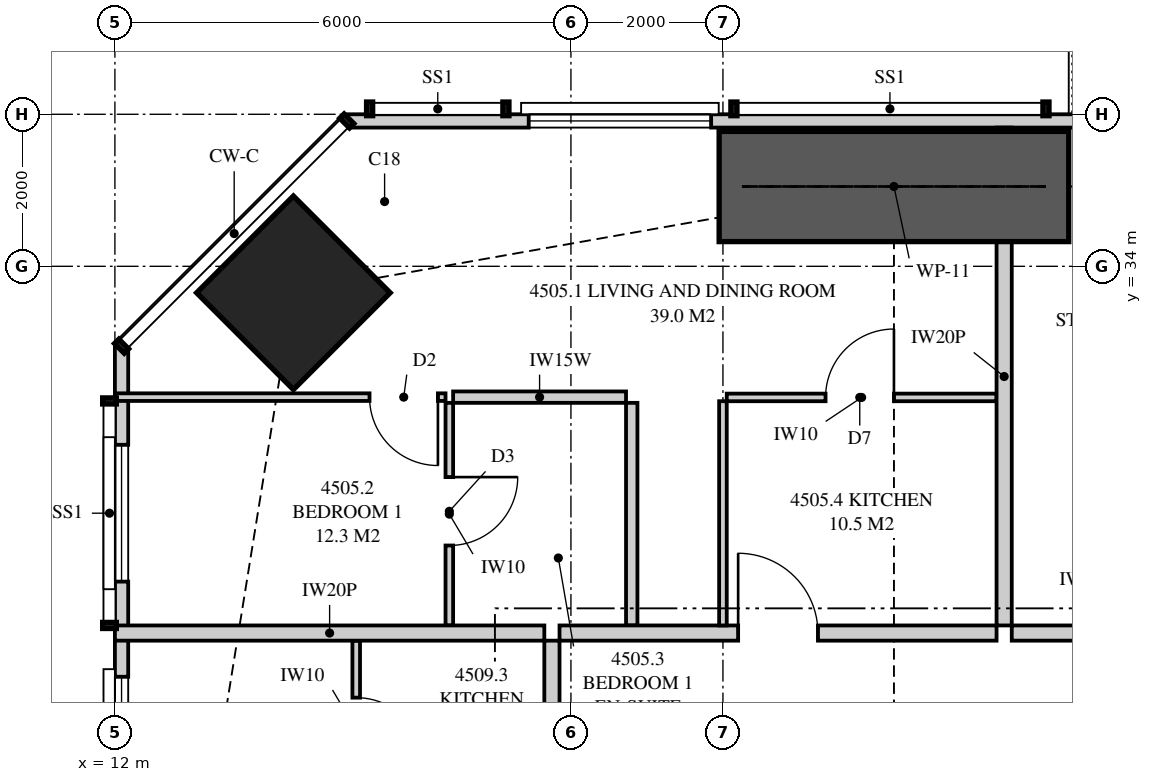
"""IFC4 building model, lengths in metres.
Left out: names, types, materials, properties, quantities, classifications, styles, units other than length and angle.
Written with IfcOpenShell. Run it as: python <this file> out.ifc"""

import sys

from ifc_helpers import new_model, si_unit, direction, frame, frame_2d, origin, origin_2d, place, context, subcontext, project, spatial, polyline, rectangle, outline, extrude, element, fill, save


model = new_model("IFC4")
c1 = context("Model", 3, precision=1e-05, world=origin(), true_north=direction((0.0, 1.0)))
c2 = subcontext(c1, "Body", "Model", "MODEL_VIEW")
j1 = project(units=[si_unit("LENGTHUNIT", "METRE"), si_unit("PLANEANGLEUNIT", "RADIAN")], contexts=[c1])
p1 = place(None, origin())
s1 = spatial("IfcSite", under=j1, at=p1, CompositionType="ELEMENT")
p2 = place(p1, origin())
s2 = spatial("IfcBuilding", under=s1, at=p2, CompositionType="ELEMENT")
p3 = place(p2, frame((0.0, 0.0, 167.75)))
s3 = spatial("IfcBuildingStorey", under=s2, at=p3, CompositionType="ELEMENT", Elevation=167.75)
p4 = place(p3, frame((14.348, 33.652, 0.0), z_axis=(0.0, 0.0, 1.0), x_axis=(0.707106781187, 0.707106781187, 0.0)))
e1 = element("IfcColumn", 1, at=p4, inside=s3, PredefinedType="COLUMN", context=c2, shape_type="SweptSolid", body=[
    extrude(rectangle(XDim=1.8, YDim=1.8, at=origin_2d()), origin(), (0.0, 0.0, 1.0), 3.35),
])
p5 = place(p3, frame((49.949, 35.913, 0.0), z_axis=(0.0, 0.0, 1.0), x_axis=(-1.0, 0.0, 0.0)))
e2 = element("IfcWall", 2, at=p5, inside=s3, PredefinedType="SOLIDWALL", context=c2, shape_type="SweptSolid", body=[
    extrude(outline(polyline([(0.0, 0.0), (34.897, 0.0), (34.897, 3.11), (27.91, 3.11), (27.91, 2.15), (27.836, 2.15), (27.836, 3.11), (27.699, 3.11), (27.699, 2.15), (7.199, 2.15), (7.199, 3.11), (7.062, 3.11), (7.062, 2.15), (6.987, 2.15), (6.987, 3.11), (0.0, 3.11), (0.0, 0.0)])), frame((0.0, 0.087, 0.0), z_axis=(0.0, -1.0, 0.0), x_axis=(1.0, 0.0, 0.0)), (0.0, 0.0, 1.0), 0.175),
])
p6 = place(p5, frame((2.149, 0.0, 0.4)))
e3 = element("IfcOpeningElement", 3, at=p6, cuts=e2, PredefinedType="OPENING", context=c2, shape_type="SweptSolid", body=[
    extrude(rectangle(XDim=1.8, YDim=1.7, at=frame_2d((0.9, 0.85))), frame((0.0, 0.097, 0.0), z_axis=(0.0, -1.0, 0.0), x_axis=(1.0, 0.0, 0.0)), (0.0, 0.0, 1.0), 0.195),
])
p7 = place(p5, frame((10.299, 0.0, 0.0)))
e4 = element("IfcOpeningElement", 4, at=p7, cuts=e2, PredefinedType="OPENING", context=c2, shape_type="SweptSolid", body=[
    extrude(rectangle(XDim=1.8, YDim=2.1, at=frame_2d((0.9, 1.05))), frame((0.0, 0.097, 0.0), z_axis=(0.0, -1.0, 0.0), x_axis=(1.0, 0.0, 0.0)), (0.0, 0.0, 1.0), 0.195),
])
p8 = place(p5, frame((13.231, 0.0, 0.4)))
e5 = element("IfcOpeningElement", 5, at=p8, cuts=e2, PredefinedType="OPENING", context=c2, shape_type="SweptSolid", body=[
    extrude(rectangle(XDim=1.8, YDim=1.7, at=frame_2d((0.9, 0.85))), frame((0.0, 0.097, 0.0), z_axis=(0.0, -1.0, 0.0), x_axis=(1.0, 0.0, 0.0)), (0.0, 0.0, 1.0), 0.195),
])
p9 = place(p5, frame((22.699, 0.0, 0.0)))
e6 = element("IfcOpeningElement", 6, at=p9, cuts=e2, PredefinedType="OPENING", context=c2, shape_type="SweptSolid", body=[
    extrude(rectangle(XDim=1.8, YDim=2.1, at=frame_2d((0.9, 1.05))), frame((0.0, 0.097, 0.0), z_axis=(0.0, -1.0, 0.0), x_axis=(1.0, 0.0, 0.0)), (0.0, 0.0, 1.0), 0.195),
])
p10 = place(p5, frame((19.853, 0.0, 0.4)))
e7 = element("IfcOpeningElement", 7, at=p10, cuts=e2, PredefinedType="OPENING", context=c2, shape_type="SweptSolid", body=[
    extrude(rectangle(XDim=2.4, YDim=1.7, at=frame_2d((1.2, 0.85))), frame((0.0, 0.097, 0.0), z_axis=(0.0, -1.0, 0.0), x_axis=(1.0, 0.0, 0.0)), (0.0, 0.0, 1.0), 0.195),
])
p11 = place(p5, frame((30.104, 0.0, 0.4)))
e8 = element("IfcOpeningElement", 8, at=p11, cuts=e2, PredefinedType="OPENING", context=c2, shape_type="SweptSolid", body=[
    extrude(rectangle(XDim=2.4, YDim=1.7, at=frame_2d((1.2, 0.85))), frame((0.0, 0.097, 0.0), z_axis=(0.0, -1.0, 0.0), x_axis=(1.0, 0.0, 0.0)), (0.0, 0.0, 1.0), 0.195),
])
p12 = place(p3, frame((12.087, 32.949, 0.0), z_axis=(0.0, 0.0, 1.0), x_axis=(0.0, -1.0, 0.0)))
e9 = element("IfcWall", 9, at=p12, inside=s3, PredefinedType="SOLIDWALL", context=c2, shape_type="SweptSolid", body=[
    extrude(outline(polyline([(0.0, 0.0), (29.897, 0.0), (29.897, 3.11), (20.191, 3.11), (20.191, 2.15), (20.051, 2.15), (20.051, 3.11), (19.949, 3.11), (19.949, 2.15), (7.949, 2.15), (7.949, 3.11), (7.823, 3.11), (7.823, 2.15), (7.73, 2.15), (7.73, 3.11), (0.0, 3.11), (0.0, 0.0)])), frame((0.0, 0.087, 0.0), z_axis=(0.0, -1.0, 0.0), x_axis=(1.0, 0.0, 0.0)), (0.0, 0.0, 1.0), 0.175),
])
p13 = place(p12, frame((1.297, 0.0, 0.4)))
e10 = element("IfcOpeningElement", 10, at=p13, cuts=e9, PredefinedType="OPENING", context=c2, shape_type="SweptSolid", body=[
    extrude(rectangle(XDim=1.8, YDim=1.7, at=frame_2d((0.9, 0.85))), frame((0.0, 0.097, 0.0), z_axis=(0.0, -1.0, 0.0), x_axis=(1.0, 0.0, 0.0)), (0.0, 0.0, 1.0), 0.195),
])
p14 = place(p12, frame((4.349, 0.0, 0.4)))
e11 = element("IfcOpeningElement", 11, at=p14, cuts=e9, PredefinedType="OPENING", context=c2, shape_type="SweptSolid", body=[
    extrude(rectangle(XDim=1.2, YDim=1.7, at=frame_2d((0.6, 0.85))), frame((0.0, 0.097, 0.0), z_axis=(0.0, -1.0, 0.0), x_axis=(1.0, 0.0, 0.0)), (0.0, 0.0, 1.0), 0.195),
])
p15 = place(p12, frame((11.024, 0.0, 0.4)))
e12 = element("IfcOpeningElement", 12, at=p15, cuts=e9, PredefinedType="OPENING", context=c2, shape_type="SweptSolid", body=[
    extrude(rectangle(XDim=1.8, YDim=1.7, at=frame_2d((0.9, 0.85))), frame((0.0, 0.097, 0.0), z_axis=(0.0, -1.0, 0.0), x_axis=(1.0, 0.0, 0.0)), (0.0, 0.0, 1.0), 0.195),
])
p16 = place(p12, frame((15.044, 0.0, 0.4)))
e13 = element("IfcOpeningElement", 13, at=p16, cuts=e9, PredefinedType="OPENING", context=c2, shape_type="SweptSolid", body=[
    extrude(rectangle(XDim=2.4, YDim=1.7, at=frame_2d((1.2, 0.85))), frame((0.0, 0.097, 0.0), z_axis=(0.0, -1.0, 0.0), x_axis=(1.0, 0.0, 0.0)), (0.0, 0.0, 1.0), 0.195),
])
p17 = place(p12, frame((22.624, 0.0, 0.0)))
e14 = element("IfcOpeningElement", 14, at=p17, cuts=e9, PredefinedType="OPENING", context=c2, shape_type="SweptSolid", body=[
    extrude(rectangle(XDim=1.8, YDim=2.1, at=frame_2d((0.9, 1.05))), frame((0.0, 0.097, 0.0), z_axis=(0.0, -1.0, 0.0), x_axis=(1.0, 0.0, 0.0)), (0.0, 0.0, 1.0), 0.195),
])
p18 = place(p12, frame((26.301, 0.0, 0.4)))
e15 = element("IfcOpeningElement", 15, at=p18, cuts=e9, PredefinedType="OPENING", context=c2, shape_type="SweptSolid", body=[
    extrude(rectangle(XDim=1.8, YDim=1.7, at=frame_2d((0.9, 0.85))), frame((0.0, 0.097, 0.0), z_axis=(0.0, -1.0, 0.0), x_axis=(1.0, 0.0, 0.0)), (0.0, 0.0, 1.0), 0.195),
])
p19 = place(p3, frame((23.7, 35.825, 0.0), z_axis=(0.0, 0.0, 1.0), x_axis=(0.0, -1.0, 0.0)))
e16 = element("IfcWall", 16, at=p19, inside=s3, PredefinedType="PARTITIONING", context=c2, shape_type="SweptSolid", body=[
    extrude(outline(polyline([(0.529, 2.15), (0.0, 2.15), (0.0, 0.0), (0.529, 0.0), (0.529, 0.332), (1.021, 0.332), (1.021, 0.0), (6.55, 0.0), (6.55, 3.11), (1.685, 3.11), (1.685, 2.15), (1.021, 2.15), (1.021, 1.818), (0.529, 1.818), (0.529, 2.15)])), frame((0.0, 0.1, 0.0), z_axis=(0.0, -1.0, 0.0), x_axis=(1.0, 0.0, 0.0)), (0.0, 0.0, 1.0), 0.2),
])
p20 = place(p3, frame((17.85, 29.175, 0.0), z_axis=(0.0, 0.0, 1.0), x_axis=(1.0, 0.0, 0.0)))
e17 = element("IfcWall", 17, at=p20, inside=s3, PredefinedType="PARTITIONING", context=c2, shape_type="SweptSolid", body=[
    extrude(outline(polyline([(0.0, 0.0), (5.75, 0.0), (5.75, 3.11), (4.737, 3.11), (4.737, 2.541), (4.062, 2.541), (4.062, 3.11), (0.0, 3.11), (0.0, 0.0)])), frame((0.0, 0.1, 0.0), z_axis=(0.0, -1.0, 0.0), x_axis=(1.0, 0.0, 0.0)), (0.0, 0.0, 1.0), 0.2),
])
p21 = place(p20, frame((2.35, 0.0, 0.0)))
e18 = element("IfcOpeningElement", 18, at=p21, cuts=e17, PredefinedType="OPENING", context=c2, shape_type="SweptSolid", body=[
    extrude(rectangle(XDim=1.05, YDim=2.2, at=frame_2d((0.525, 1.1))), frame((0.0, 0.11, 0.0), z_axis=(0.0, -1.0, 0.0), x_axis=(1.0, 0.0, 0.0)), (0.0, 0.0, 1.0), 0.22),
])
p22 = place(p3, frame((16.4, 32.204, 0.0), z_axis=(0.0, 0.0, 1.0), x_axis=(0.0, -1.0, 0.0)))
e19 = element("IfcWall", 19, at=p22, inside=s3, PredefinedType="PARTITIONING", context=c2, shape_type="SweptSolid", body=[
    extrude(rectangle(XDim=2.929, YDim=0.1, at=frame_2d((1.464, 0.0))), origin(), (0.0, 0.0, 1.0), 3.11),
])
p23 = place(p22, frame((0.977, 0.0, 0.0)))
e20 = element("IfcOpeningElement", 20, at=p23, cuts=e19, PredefinedType="OPENING", context=c2, shape_type="SweptSolid", body=[
    extrude(rectangle(XDim=0.9, YDim=2.1, at=frame_2d((0.45, 1.05))), frame((0.0, 0.06, 0.0), z_axis=(0.0, -1.0, 0.0), x_axis=(1.0, 0.0, 0.0)), (0.0, 0.0, 1.0), 0.12),
])
p24 = place(p3, frame((16.35, 32.279, 0.0), z_axis=(0.0, 0.0, 1.0), x_axis=(-1.0, 0.0, 0.0)))
e21 = element("IfcWall", 21, at=p24, inside=s3, PredefinedType="PARTITIONING", context=c2, shape_type="SweptSolid", body=[
    extrude(outline(polyline([(0.0, 0.0), (4.35, 0.0), (4.35, 3.11), (3.094, 3.11), (3.094, 2.15), (1.352, 2.15), (1.352, 3.11), (0.0, 3.11), (0.0, 0.0)])), frame((0.0, 0.05, 0.0), z_axis=(0.0, -1.0, 0.0), x_axis=(1.0, 0.0, 0.0)), (0.0, 0.0, 1.0), 0.1),
])
p25 = place(p24, frame((0.1, 0.0, 0.0)))
e22 = element("IfcOpeningElement", 22, at=p25, cuts=e21, PredefinedType="OPENING", context=c2, shape_type="SweptSolid", body=[
    extrude(rectangle(XDim=0.9, YDim=2.1, at=frame_2d((0.45, 1.05))), frame((0.0, 0.06, 0.0), z_axis=(0.0, -1.0, 0.0), x_axis=(1.0, 0.0, 0.0)), (0.0, 0.0, 1.0), 0.12),
])
p26 = place(p3, frame((18.725, 32.279, 0.0), z_axis=(0.0, 0.0, 1.0), x_axis=(-1.0, 0.0, 0.0)))
e23 = element("IfcWall", 23, at=p26, inside=s3, PredefinedType="PLUMBINGWALL", context=c2, shape_type="SweptSolid", body=[
    extrude(rectangle(XDim=2.275, YDim=0.15, at=frame_2d((1.138, 0.0))), origin(), (0.0, 0.0, 1.0), 3.11),
])
p27 = place(p3, frame((18.8, 32.204, 0.0), z_axis=(0.0, 0.0, 1.0), x_axis=(0.0, -1.0, 0.0)))
e24 = element("IfcWall", 24, at=p27, inside=s3, PredefinedType="PLUMBINGWALL", context=c2, shape_type="SweptSolid", body=[
    extrude(rectangle(XDim=2.929, YDim=0.15, at=frame_2d((1.464, 0.0))), origin(), (0.0, 0.0, 1.0), 3.11),
])
p28 = place(p3, frame((20.05, 32.275, 0.0), z_axis=(0.0, 0.0, 1.0), x_axis=(1.0, 0.0, 0.0)))
e25 = element("IfcWall", 25, at=p28, inside=s3, PredefinedType="PARTITIONING", context=c2, shape_type="SweptSolid", body=[
    extrude(outline(polyline([(0.0, 0.0), (3.55, 0.0), (3.55, 3.11), (2.487, 3.11), (2.487, 2.541), (1.913, 2.541), (1.913, 3.11), (0.0, 3.11), (0.0, 0.0)])), frame((0.0, 0.05, 0.0), z_axis=(0.0, -1.0, 0.0), x_axis=(1.0, 0.0, 0.0)), (0.0, 0.0, 1.0), 0.1),
])
p29 = place(p28, frame((1.3, 0.0, 0.0)))
e26 = element("IfcOpeningElement", 26, at=p29, cuts=e25, PredefinedType="OPENING", context=c2, shape_type="SweptSolid", body=[
    extrude(rectangle(XDim=0.9, YDim=2.1, at=frame_2d((0.45, 1.05))), frame((0.0, 0.06, 0.0), z_axis=(0.0, -1.0, 0.0), x_axis=(1.0, 0.0, 0.0)), (0.0, 0.0, 1.0), 0.12),
])
p30 = place(p3, frame((20.0, 32.225, 0.0), z_axis=(0.0, 0.0, 1.0), x_axis=(0.0, -1.0, 0.0)))
e27 = element("IfcWall", 27, at=p30, inside=s3, PredefinedType="PARTITIONING", context=c2, shape_type="SweptSolid", body=[
    extrude(rectangle(XDim=2.95, YDim=0.1, at=frame_2d((1.475, 0.0))), origin(), (0.0, 0.0, 1.0), 3.11),
])
p31 = place(p3, frame((23.8, 29.175, 0.0), z_axis=(0.0, 0.0, 1.0), x_axis=(1.0, 0.0, 0.0)))
e28 = element("IfcWall", 28, at=p31, inside=s3, PredefinedType="PARTITIONING", context=c2, shape_type="SweptSolid", body=[
    extrude(rectangle(XDim=1.9, YDim=0.2, at=frame_2d((0.95, 0.0))), origin(), (0.0, 0.0, 1.0), 3.11),
])
p32 = place(p3, frame((12.0, 29.175, 0.0), z_axis=(0.0, 0.0, 1.0), x_axis=(1.0, 0.0, 0.0)))
e29 = element("IfcWall", 29, at=p32, inside=s3, PredefinedType="PARTITIONING", context=c2, shape_type="SweptSolid", body=[
    extrude(outline(polyline([(0.0, 0.0), (5.65, 0.0), (5.65, 3.11), (2.547, 3.11), (2.547, 2.15), (0.703, 2.15), (0.703, 3.11), (0.0, 3.11), (0.0, 0.0)])), frame((0.0, 0.1, 0.0), z_axis=(0.0, -1.0, 0.0), x_axis=(1.0, 0.0, 0.0)), (0.0, 0.0, 1.0), 0.2),
])
p33 = place(p3, frame((17.75, 23.0, 0.0), z_axis=(0.0, 0.0, 1.0), x_axis=(0.0, 1.0, 0.0)))
e30 = element("IfcWall", 30, at=p33, inside=s3, PredefinedType="PARTITIONING", context=c2, shape_type="SweptSolid", body=[
    extrude(outline(polyline([(0.0, 0.0), (6.075, 0.0), (6.075, 3.11), (2.337, 3.11), (2.337, 2.541), (1.663, 2.541), (1.663, 3.11), (0.0, 3.11), (0.0, 0.0)])), frame((0.0, 0.1, 0.0), z_axis=(0.0, -1.0, 0.0), x_axis=(1.0, 0.0, 0.0)), (0.0, 0.0, 1.0), 0.2),
])
p34 = place(p33, frame((2.538, 0.0, 0.0)))
e31 = element("IfcOpeningElement", 31, at=p34, cuts=e30, PredefinedType="OPENING", context=c2, shape_type="SweptSolid", body=[
    extrude(rectangle(XDim=1.05, YDim=2.2, at=frame_2d((0.525, 1.1))), frame((0.0, 0.11, 0.0), z_axis=(0.0, -1.0, 0.0), x_axis=(1.0, 0.0, 0.0)), (0.0, 0.0, 1.0), 0.22),
])
p35 = place(p3, frame((15.175, 26.725, 0.0), z_axis=(0.0, 0.0, 1.0), x_axis=(0.0, 1.0, 0.0)))
e32 = element("IfcWall", 32, at=p35, inside=s3, PredefinedType="PARTITIONING", context=c2, shape_type="SweptSolid", body=[
    extrude(rectangle(XDim=2.35, YDim=0.1, at=frame_2d((1.175, 0.0))), origin(), (0.0, 0.0, 1.0), 3.11),
])
p36 = place(p35, frame((0.7, 0.0, 0.0)))
e33 = element("IfcOpeningElement", 33, at=p36, cuts=e32, PredefinedType="OPENING", context=c2, shape_type="SweptSolid", body=[
    extrude(rectangle(XDim=0.9, YDim=2.1, at=frame_2d((0.45, 1.05))), frame((0.0, 0.06, 0.0), z_axis=(0.0, -1.0, 0.0), x_axis=(1.0, 0.0, 0.0)), (0.0, 0.0, 1.0), 0.12),
])
p37 = place(p3, frame((19.95, 35.05, 0.0), z_axis=(0.0, 0.0, 1.0), x_axis=(1.0, 0.0, 0.0)))
e34 = element("IfcWall", 34, at=p37, inside=s3, PredefinedType="SHEAR", context=c2, shape_type="SweptSolid", body=[
    extrude(rectangle(XDim=4.6, YDim=1.45, at=frame_2d((2.3, 0.0))), origin(), (0.0, 0.0, 1.0), 3.35),
])
p38 = place(p11, origin())
e35 = element("IfcWindow", 35, at=p38, inside=s3, PartitioningType="SINGLE_PANEL", PredefinedType="WINDOW", context=c2, shape_type="SweptSolid", body=[
    extrude(rectangle(XDim=2.4, YDim=1.7, at=frame_2d((1.2, 0.85))), frame((0.0, 0.03, 0.0), z_axis=(0.0, -1.0, 0.0), x_axis=(1.0, 0.0, 0.0)), (0.0, 0.0, 1.0), 0.06),
])
fill(e8, e35)
p39 = place(p13, origin())
e36 = element("IfcWindow", 36, at=p39, inside=s3, PartitioningType="SINGLE_PANEL", PredefinedType="WINDOW", context=c2, shape_type="SweptSolid", body=[
    extrude(rectangle(XDim=1.8, YDim=1.7, at=frame_2d((0.9, 0.85))), frame((0.0, 0.03, 0.0), z_axis=(0.0, -1.0, 0.0), x_axis=(1.0, 0.0, 0.0)), (0.0, 0.0, 1.0), 0.06),
])
fill(e10, e36)
p40 = place(p14, origin())
e37 = element("IfcWindow", 37, at=p40, inside=s3, PartitioningType="SINGLE_PANEL", PredefinedType="WINDOW", context=c2, shape_type="SweptSolid", body=[
    extrude(rectangle(XDim=1.2, YDim=1.7, at=frame_2d((0.6, 0.85))), frame((0.0, 0.03, 0.0), z_axis=(0.0, -1.0, 0.0), x_axis=(1.0, 0.0, 0.0)), (0.0, 0.0, 1.0), 0.06),
])
fill(e11, e37)
p41 = place(p21, origin())
e38 = element("IfcDoor", 38, at=p41, inside=s3, OperationType="SINGLE_SWING_LEFT", PredefinedType="DOOR", context=c2, shape_type="SweptSolid", body=[
    extrude(rectangle(XDim=1.05, YDim=2.2, at=frame_2d((0.525, 1.1))), frame((0.0, 0.025, 0.0), z_axis=(0.0, -1.0, 0.0), x_axis=(1.0, 0.0, 0.0)), (0.0, 0.0, 1.0), 0.05),
])
fill(e18, e38)
p42 = place(p25, origin())
e39 = element("IfcDoor", 39, at=p42, inside=s3, OperationType="SINGLE_SWING_LEFT", PredefinedType="DOOR", context=c2, shape_type="SweptSolid", body=[
    extrude(rectangle(XDim=0.9, YDim=2.1, at=frame_2d((0.45, 1.05))), frame((0.0, 0.025, 0.0), z_axis=(0.0, -1.0, 0.0), x_axis=(1.0, 0.0, 0.0)), (0.0, 0.0, 1.0), 0.05),
])
fill(e22, e39)
p43 = place(p23, origin())
e40 = element("IfcDoor", 40, at=p43, inside=s3, OperationType="SINGLE_SWING_LEFT", PredefinedType="DOOR", context=c2, shape_type="SweptSolid", body=[
    extrude(rectangle(XDim=0.9, YDim=2.1, at=frame_2d((0.45, 1.05))), frame((0.0, 0.025, 0.0), z_axis=(0.0, -1.0, 0.0), x_axis=(1.0, 0.0, 0.0)), (0.0, 0.0, 1.0), 0.05),
])
fill(e20, e40)
p44 = place(p29, origin())
e41 = element("IfcDoor", 41, at=p44, inside=s3, OperationType="SINGLE_SWING_RIGHT", PredefinedType="DOOR", context=c2, shape_type="SweptSolid", body=[
    extrude(rectangle(XDim=0.9, YDim=2.1, at=frame_2d((0.45, 1.05))), frame((0.0, 0.025, 0.0), z_axis=(0.0, -1.0, 0.0), x_axis=(1.0, 0.0, 0.0)), (0.0, 0.0, 1.0), 0.05),
])
fill(e26, e41)
p45 = place(p36, frame((0.9, 0.0, 0.0), z_axis=(0.0, 0.0, 1.0), x_axis=(-1.0, 0.0, 0.0)))
e42 = element("IfcDoor", 42, at=p45, inside=s3, OperationType="SINGLE_SWING_RIGHT", PredefinedType="DOOR", context=c2, shape_type="SweptSolid", body=[
    extrude(rectangle(XDim=0.9, YDim=2.1, at=frame_2d((0.45, 1.05))), frame((0.0, 0.025, 0.0), z_axis=(0.0, -1.0, 0.0), x_axis=(1.0, 0.0, 0.0)), (0.0, 0.0, 1.0), 0.05),
])
fill(e33, e42)
save(model, sys.argv[1])
